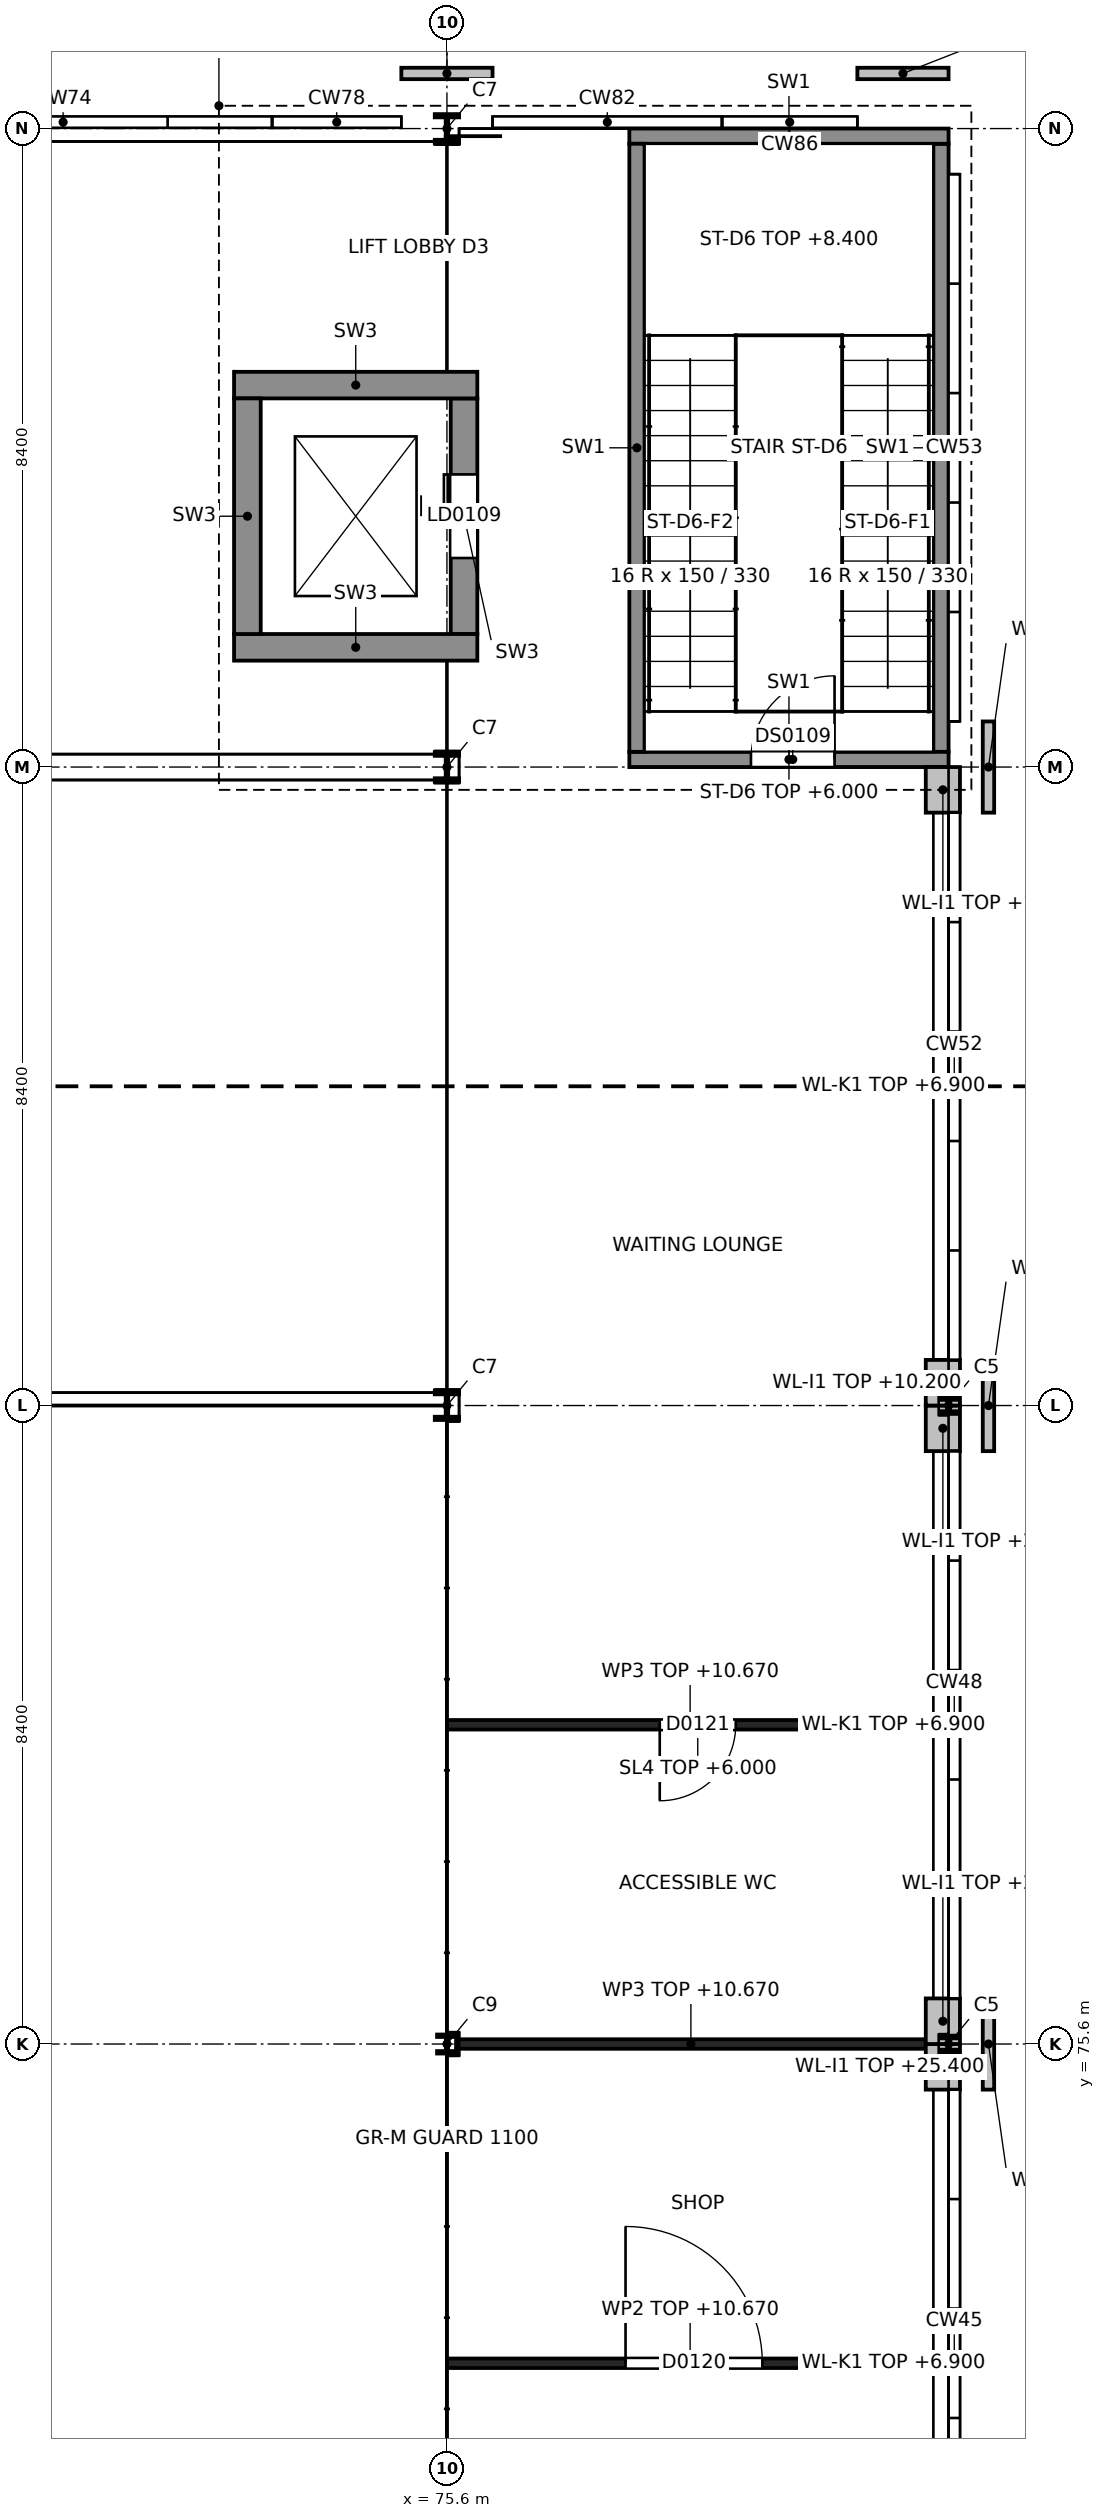
"""IFC4 building model, lengths in metres.
Left out: names, types, materials, properties, quantities, classifications, styles, units other than length and angle.
Written with IfcOpenShell. Run it as: python <this file> out.ifc"""

import sys

from ifc_helpers import new_model, si_unit, direction, frame, frame_2d, origin, origin_2d, place, context, subcontext, project, spatial, rectangle, i_section, extrude, element, fill, save


model = new_model("IFC4")
c1 = context("Model", 3, precision=1e-05, world=origin(), true_north=direction((0.0, 1.0)))
c2 = subcontext(c1, "Body", "Model", "MODEL_VIEW")
j1 = project(units=[si_unit("LENGTHUNIT", "METRE"), si_unit("PLANEANGLEUNIT", "RADIAN")], contexts=[c1])
p1 = place(None, origin())
s1 = spatial("IfcSite", under=j1, at=p1, CompositionType="ELEMENT")
p2 = place(p1, origin())
s2 = spatial("IfcBuilding", under=s1, at=p2, CompositionType="ELEMENT")
p3 = place(p2, frame((0.0, 0.0, 6.0)))
s3 = spatial("IfcBuildingStorey", under=s2, at=p3, CompositionType="ELEMENT", Elevation=6.0)
p4 = place(p3, frame((75.6, 75.6, 0.0), z_axis=(0.0, 0.0, 1.0), x_axis=(1.0, 0.0, 0.0)))
e1 = element("IfcColumn", 1, at=p4, inside=s3, PredefinedType="COLUMN", context=c2, shape_type="SweptSolid", body=[
    extrude(i_section(OverallWidth=0.24, OverallDepth=0.23, WebThickness=0.008, FlangeThickness=0.012, at=origin_2d()), origin(), (0.0, 0.0, 1.0), 4.8),
])
for number, where, z_axis, x_axis in (
    (2, (75.6, 84.0, 0.0), (0.0, 0.0, 1.0), (1.0, 0.0, 0.0)),
    (3, (75.6, 92.4, 0.0), (0.0, 0.0, 1.0), (1.0, 0.0, 0.0)),
    (4, (75.6, 100.8, 0.0), (0.0, 0.0, 1.0), (1.0, 0.0, 0.0)),
):
    element("IfcColumn", number, at=place(p3, frame(where, z_axis=z_axis, x_axis=x_axis)), inside=s3, PredefinedType="COLUMN", context=c2, shape_type="SweptSolid", body=[
        extrude(i_section(OverallWidth=0.3, OverallDepth=0.36, WebThickness=0.012, FlangeThickness=0.022, at=origin_2d()), origin(), (0.0, 0.0, 1.0), 4.8),
    ])
for number, where, z_axis, x_axis in (
    (5, (82.2, 75.6, 0.0), (0.0, 0.0, 1.0), (1.0, 0.0, 0.0)),
    (6, (82.2, 84.0, 0.0), (0.0, 0.0, 1.0), (1.0, 0.0, 0.0)),
):
    element("IfcColumn", number, at=place(p3, frame(where, z_axis=z_axis, x_axis=x_axis)), inside=s3, PredefinedType="COLUMN", context=c2, shape_type="SweptSolid", body=[
        extrude(i_section(OverallWidth=0.2, OverallDepth=0.2, WebThickness=0.009, FlangeThickness=0.015, at=origin_2d()), origin(), (0.0, 0.0, 1.0), 4.8),
    ])
p5 = place(p3, frame((78.0, 92.5, 0.0), z_axis=(0.0, 0.0, 1.0), x_axis=(1.0, 0.0, 0.0)))
e7 = element("IfcWall", 7, at=p5, inside=s3, PredefinedType="SHEAR", context=c2, shape_type="SweptSolid", body=[
    extrude(rectangle(XDim=4.2, YDim=0.2, at=frame_2d((2.1, 0.0))), origin(), (0.0, 0.0, 1.0), 4.8),
])
p6 = place(p5, frame((1.6, 0.0, 0.0)))
e8 = element("IfcOpeningElement", 8, at=p6, cuts=e7, PredefinedType="OPENING", context=c2, shape_type="SweptSolid", body=[
    extrude(rectangle(XDim=1.1, YDim=2.1, at=frame_2d((0.55, 1.05))), frame((0.0, 0.1, 0.0), z_axis=(0.0, -1.0, 0.0), x_axis=(1.0, 0.0, 0.0)), (0.0, 0.0, 1.0), 0.2),
])
p7 = place(p3, frame((78.0, 100.7, 0.0), z_axis=(0.0, 0.0, 1.0), x_axis=(1.0, 0.0, 0.0)))
e9 = element("IfcWall", 9, at=p7, inside=s3, PredefinedType="SHEAR", context=c2, shape_type="SweptSolid", body=[
    extrude(rectangle(XDim=4.2, YDim=0.2, at=frame_2d((2.1, 0.0))), origin(), (0.0, 0.0, 1.0), 4.8),
])
for number, where, z_axis, x_axis in (
    (10, (78.1, 92.6, 0.0), (0.0, 0.0, 1.0), (0.0, 1.0, 0.0)),
    (11, (82.1, 92.6, 0.0), (0.0, 0.0, 1.0), (0.0, 1.0, 0.0)),
):
    element("IfcWall", number, at=place(p3, frame(where, z_axis=z_axis, x_axis=x_axis)), inside=s3, PredefinedType="SHEAR", context=c2, shape_type="SweptSolid", body=[
        extrude(rectangle(XDim=8.0, YDim=0.2, at=frame_2d((4.0, 0.0))), origin(), (0.0, 0.0, 1.0), 4.8),
    ])
for number, where, z_axis, x_axis in (
    (12, (72.8, 93.975, 0.0), (0.0, 0.0, 1.0), (1.0, 0.0, 0.0)),
    (13, (72.8, 97.425, 0.0), (0.0, 0.0, 1.0), (1.0, 0.0, 0.0)),
):
    element("IfcWall", number, at=place(p3, frame(where, z_axis=z_axis, x_axis=x_axis)), inside=s3, PredefinedType="SHEAR", context=c2, shape_type="SweptSolid", body=[
        extrude(rectangle(XDim=3.2, YDim=0.35, at=frame_2d((1.6, 0.0))), origin(), (0.0, 0.0, 1.0), 4.8),
    ])
p8 = place(p3, frame((72.975, 94.15, 0.0), z_axis=(0.0, 0.0, 1.0), x_axis=(0.0, 1.0, 0.0)))
e14 = element("IfcWall", 14, at=p8, inside=s3, PredefinedType="SHEAR", context=c2, shape_type="SweptSolid", body=[
    extrude(rectangle(XDim=3.1, YDim=0.35, at=frame_2d((1.55, 0.0))), origin(), (0.0, 0.0, 1.0), 4.8),
])
p9 = place(p3, frame((75.825, 94.15, 0.0), z_axis=(0.0, 0.0, 1.0), x_axis=(0.0, 1.0, 0.0)))
e15 = element("IfcWall", 15, at=p9, inside=s3, PredefinedType="SHEAR", context=c2, shape_type="SweptSolid", body=[
    extrude(rectangle(XDim=3.1, YDim=0.35, at=frame_2d((1.55, 0.0))), origin(), (0.0, 0.0, 1.0), 4.8),
])
p10 = place(p9, frame((1.0, 0.0, 0.0)))
e16 = element("IfcOpeningElement", 16, at=p10, cuts=e15, PredefinedType="OPENING", context=c2, shape_type="SweptSolid", body=[
    extrude(rectangle(XDim=1.1, YDim=2.1, at=frame_2d((0.55, 1.05))), frame((0.0, 0.175, 0.0), z_axis=(0.0, -1.0, 0.0), x_axis=(1.0, 0.0, 0.0)), (0.0, 0.0, 1.0), 0.35),
])
p11 = place(p3, frame((82.175, 67.8, 0.0), z_axis=(0.0, 0.0, 1.0), x_axis=(0.0, 1.0, 0.0)))
e17 = element("IfcWall", 17, at=p11, inside=s3, PredefinedType="SOLIDWALL", context=c2, shape_type="SweptSolid", body=[
    extrude(rectangle(XDim=7.2, YDim=0.35, at=frame_2d((3.6, 0.0))), origin(), (0.0, 0.0, 1.0), 0.9),
])
p12 = place(p3, frame((82.125, 75.0, 0.0), z_axis=(0.0, 0.0, 1.0), x_axis=(0.0, 1.0, 0.0)))
e18 = element("IfcWall", 18, at=p12, inside=s3, PredefinedType="SOLIDWALL", context=c2, shape_type="SweptSolid", body=[
    extrude(rectangle(XDim=0.6, YDim=0.45, at=frame_2d((0.3, 0.0))), origin(), (0.0, 0.0, 1.0), 19.4),
])
p13 = place(p3, frame((82.175, 76.2, 0.0), z_axis=(0.0, 0.0, 1.0), x_axis=(0.0, 1.0, 0.0)))
e19 = element("IfcWall", 19, at=p13, inside=s3, PredefinedType="SOLIDWALL", context=c2, shape_type="SweptSolid", body=[
    extrude(rectangle(XDim=7.2, YDim=0.35, at=frame_2d((3.6, 0.0))), origin(), (0.0, 0.0, 1.0), 0.9),
])
p14 = place(p3, frame((82.125, 75.6, 0.0), z_axis=(0.0, 0.0, 1.0), x_axis=(0.0, 1.0, 0.0)))
e20 = element("IfcWall", 20, at=p14, inside=s3, PredefinedType="SOLIDWALL", context=c2, shape_type="SweptSolid", body=[
    extrude(rectangle(XDim=0.6, YDim=0.45, at=frame_2d((0.3, 0.0))), origin(), (0.0, 0.0, 1.0), 20.75),
])
p15 = place(p3, frame((82.125, 83.4, 0.0), z_axis=(0.0, 0.0, 1.0), x_axis=(0.0, 1.0, 0.0)))
e21 = element("IfcWall", 21, at=p15, inside=s3, PredefinedType="SOLIDWALL", context=c2, shape_type="SweptSolid", body=[
    extrude(rectangle(XDim=0.6, YDim=0.45, at=frame_2d((0.3, 0.0))), origin(), (0.0, 0.0, 1.0), 20.75),
])
p16 = place(p3, frame((82.175, 84.6, 0.0), z_axis=(0.0, 0.0, 1.0), x_axis=(0.0, 1.0, 0.0)))
e22 = element("IfcWall", 22, at=p16, inside=s3, PredefinedType="SOLIDWALL", context=c2, shape_type="SweptSolid", body=[
    extrude(rectangle(XDim=7.2, YDim=0.35, at=frame_2d((3.6, 0.0))), origin(), (0.0, 0.0, 1.0), 0.9),
])
p17 = place(p3, frame((82.125, 84.0, 0.0), z_axis=(0.0, 0.0, 1.0), x_axis=(0.0, 1.0, 0.0)))
e23 = element("IfcWall", 23, at=p17, inside=s3, PredefinedType="SOLIDWALL", context=c2, shape_type="SweptSolid", body=[
    extrude(rectangle(XDim=0.6, YDim=0.45, at=frame_2d((0.3, 0.0))), origin(), (0.0, 0.0, 1.0), 4.2),
])
p18 = place(p3, frame((82.125, 91.8, 0.0), z_axis=(0.0, 0.0, 1.0), x_axis=(0.0, 1.0, 0.0)))
e24 = element("IfcWall", 24, at=p18, inside=s3, PredefinedType="SOLIDWALL", context=c2, shape_type="SweptSolid", body=[
    extrude(rectangle(XDim=0.6, YDim=0.45, at=frame_2d((0.3, 0.0))), origin(), (0.0, 0.0, 1.0), 4.2),
])
p19 = place(p3, frame((82.725, 75.0, 0.0), z_axis=(0.0, 0.0, 1.0), x_axis=(0.0, 1.0, 0.0)))
e25 = element("IfcWall", 25, at=p19, inside=s3, PredefinedType="SOLIDWALL", context=c2, shape_type="SweptSolid", body=[
    extrude(rectangle(XDim=1.2, YDim=0.15, at=frame_2d((0.6, 0.0))), origin(), (0.0, 0.0, 1.0), 4.8),
])
p20 = place(p3, frame((82.725, 83.4, 0.0), z_axis=(0.0, 0.0, 1.0), x_axis=(0.0, 1.0, 0.0)))
e26 = element("IfcWall", 26, at=p20, inside=s3, PredefinedType="SOLIDWALL", context=c2, shape_type="SweptSolid", body=[
    extrude(rectangle(XDim=1.2, YDim=0.15, at=frame_2d((0.6, 0.0))), origin(), (0.0, 0.0, 1.0), 4.8),
])
for number, where, z_axis, x_axis in (
    (27, (82.725, 91.8, 0.0), (0.0, 0.0, 1.0), (0.0, 1.0, 0.0)),
    (28, (75.0, 101.525, 0.0), (0.0, 0.0, 1.0), (1.0, 0.0, 0.0)),
    (29, (81.0, 101.525, 0.0), (0.0, 0.0, 1.0), (1.0, 0.0, 0.0)),
):
    element("IfcWall", number, at=place(p3, frame(where, z_axis=z_axis, x_axis=x_axis)), inside=s3, PredefinedType="SOLIDWALL", context=c2, shape_type="SweptSolid", body=[
        extrude(rectangle(XDim=1.2, YDim=0.15, at=frame_2d((0.6, 0.0))), origin(), (0.0, 0.0, 1.0), 4.8),
    ])
p21 = place(p3, frame((75.6, 71.4, 0.0), z_axis=(0.0, 0.0, 1.0), x_axis=(1.0, 0.0, 0.0)))
e30 = element("IfcWall", 30, at=p21, inside=s3, PredefinedType="PARTITIONING", context=c2, shape_type="SweptSolid", body=[
    extrude(rectangle(XDim=6.399, YDim=0.125, at=frame_2d((3.2, 0.0))), origin(), (0.0, 0.0, 1.0), 4.67),
])
p22 = place(p21, frame((2.35, 0.0, 0.0)))
e31 = element("IfcOpeningElement", 31, at=p22, cuts=e30, PredefinedType="OPENING", context=c2, shape_type="SweptSolid", body=[
    extrude(rectangle(XDim=1.8, YDim=2.1, at=frame_2d((0.9, 1.05))), frame((0.0, 0.062, 0.0), z_axis=(0.0, -1.0, 0.0), x_axis=(1.0, 0.0, 0.0)), (0.0, 0.0, 1.0), 0.125),
])
p23 = place(p3, frame((75.72, 75.6, 0.0), z_axis=(0.0, 0.0, 1.0), x_axis=(1.0, 0.0, 0.0)))
e32 = element("IfcWall", 32, at=p23, inside=s3, PredefinedType="PARTITIONING", context=c2, shape_type="SweptSolid", body=[
    extrude(rectangle(XDim=6.179, YDim=0.125, at=frame_2d((3.09, 0.0))), origin(), (0.0, 0.0, 1.0), 4.67),
])
p24 = place(p3, frame((75.6, 79.8, 0.0), z_axis=(0.0, 0.0, 1.0), x_axis=(1.0, 0.0, 0.0)))
e33 = element("IfcWall", 33, at=p24, inside=s3, PredefinedType="PARTITIONING", context=c2, shape_type="SweptSolid", body=[
    extrude(rectangle(XDim=6.399, YDim=0.125, at=frame_2d((3.2, 0.0))), origin(), (0.0, 0.0, 1.0), 4.67),
])
p25 = place(p24, frame((2.8, 0.0, 0.0)))
e34 = element("IfcOpeningElement", 34, at=p25, cuts=e33, PredefinedType="OPENING", context=c2, shape_type="SweptSolid", body=[
    extrude(rectangle(XDim=1.0, YDim=2.1, at=frame_2d((0.5, 1.05))), frame((0.0, 0.062, 0.0), z_axis=(0.0, -1.0, 0.0), x_axis=(1.0, 0.0, 0.0)), (0.0, 0.0, 1.0), 0.125),
])
p26 = place(p22, origin())
e35 = element("IfcDoor", 35, at=p26, inside=s3, OperationType="DOUBLE_DOOR_DOUBLE_SWING", PredefinedType="DOOR", context=c2, shape_type="SweptSolid", body=[
    extrude(rectangle(XDim=1.8, YDim=2.1, at=frame_2d((0.9, 1.05))), frame((0.0, 0.025, 0.0), z_axis=(0.0, -1.0, 0.0), x_axis=(1.0, 0.0, 0.0)), (0.0, 0.0, 1.0), 0.05),
])
fill(e31, e35)
p27 = place(p25, origin())
e36 = element("IfcDoor", 36, at=p27, inside=s3, OperationType="SINGLE_SWING_LEFT", PredefinedType="DOOR", context=c2, shape_type="SweptSolid", body=[
    extrude(rectangle(XDim=1.0, YDim=2.1, at=frame_2d((0.5, 1.05))), frame((0.0, 0.025, 0.0), z_axis=(0.0, -1.0, 0.0), x_axis=(1.0, 0.0, 0.0)), (0.0, 0.0, 1.0), 0.05),
])
fill(e34, e36)
p28 = place(p6, origin())
e37 = element("IfcDoor", 37, at=p28, inside=s3, OperationType="SINGLE_SWING_RIGHT", PredefinedType="DOOR", context=c2, shape_type="SweptSolid", body=[
    extrude(rectangle(XDim=1.1, YDim=2.1, at=frame_2d((0.55, 1.05))), frame((0.0, 0.025, 0.0), z_axis=(0.0, -1.0, 0.0), x_axis=(1.0, 0.0, 0.0)), (0.0, 0.0, 1.0), 0.05),
])
fill(e8, e37)
p29 = place(p10, origin())
e38 = element("IfcDoor", 38, at=p29, inside=s3, OperationType="SLIDING_TO_LEFT", PredefinedType="DOOR", context=c2, shape_type="SweptSolid", body=[
    extrude(rectangle(XDim=1.1, YDim=2.1, at=frame_2d((0.55, 1.05))), frame((0.0, 0.025, 0.0), z_axis=(0.0, -1.0, 0.0), x_axis=(1.0, 0.0, 0.0)), (0.0, 0.0, 1.0), 0.05),
])
fill(e16, e38)
save(model, sys.argv[1])
